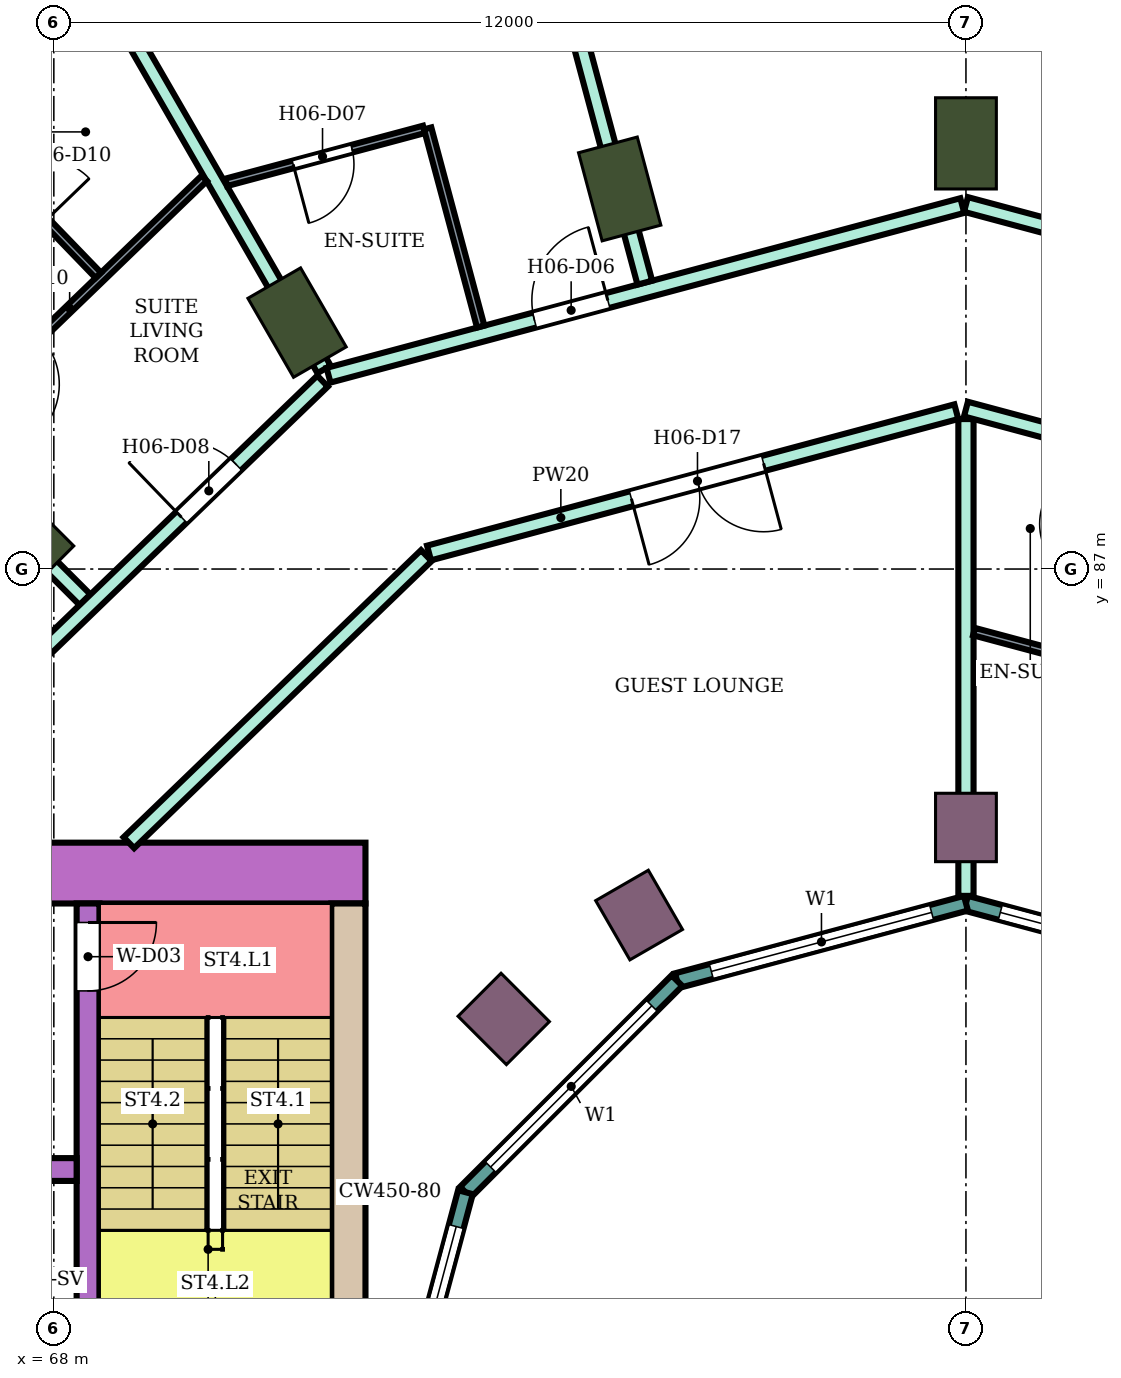
"""IFC4 building model, lengths in metres.
Left out: names, types, materials, properties, quantities, classifications, styles, units other than length and angle.
Written with IfcOpenShell. Run it as: python <this file> out.ifc"""

import sys

from ifc_helpers import new_model, si_unit, direction, frame, frame_2d, origin, origin_2d, place, context, subcontext, project, spatial, rectangle, extrude, element, fill, save


model = new_model("IFC4")
c1 = context("Model", 3, precision=1e-05, world=origin(), true_north=direction((0.0, 1.0)))
c2 = subcontext(c1, "Body", "Model", "MODEL_VIEW")
j1 = project(units=[si_unit("LENGTHUNIT", "METRE"), si_unit("PLANEANGLEUNIT", "RADIAN")], contexts=[c1])
p1 = place(None, origin())
s1 = spatial("IfcSite", under=j1, at=p1, CompositionType="ELEMENT")
p2 = place(p1, origin())
s2 = spatial("IfcBuilding", under=s1, at=p2, CompositionType="ELEMENT")
p3 = place(p2, frame((0.0, 0.0, 93.8)))
s3 = spatial("IfcBuildingStorey", under=s2, at=p3, CompositionType="ELEMENT", Elevation=93.8)
for number, where, z_axis, x_axis in (
    (1, (80.0, 92.6, 0.0), (0.0, 0.0, 1.0), (0.0, 1.0, 0.0)),
    (2, (75.445, 92.0, 0.0), (0.0, 0.0, 1.0), (-0.259, 0.966, 0.0)),
    (3, (71.2, 90.242, 0.0), (0.0, 0.0, 1.0), (-0.5, 0.866, 0.0)),
    (4, (67.555, 87.445, 0.0), (0.0, 0.0, 1.0), (-0.707, 0.707, 0.0)),
):
    element("IfcColumn", number, at=place(p3, frame(where, z_axis=z_axis, x_axis=x_axis)), inside=s3, PredefinedType="COLUMN", context=c2, shape_type="SweptSolid", body=[
        extrude(rectangle(XDim=1.2, YDim=0.8, at=origin_2d()), origin(), (0.0, 0.0, 1.0), 3.8),
    ])
for number, where, z_axis, x_axis in (
    (5, (80.0, 83.6, 0.0), (0.0, 0.0, 1.0), (0.0, 1.0, 0.0)),
    (6, (75.7, 82.448, 0.0), (0.0, 0.0, 1.0), (-0.5, 0.866, 0.0)),
    (7, (73.919, 81.081, 0.0), (0.0, 0.0, 1.0), (-0.707, 0.707, 0.0)),
):
    element("IfcColumn", number, at=place(p3, frame(where, z_axis=z_axis, x_axis=x_axis)), inside=s3, PredefinedType="COLUMN", context=c2, shape_type="SweptSolid", body=[
        extrude(rectangle(XDim=0.9, YDim=0.8, at=origin_2d()), origin(), (0.0, 0.0, 1.0), 3.8),
    ])
p4 = place(p3, frame((72.1, 83.0, 0.0), z_axis=(0.0, 0.0, 1.0), x_axis=(-1.0, 0.0, 0.0)))
e8 = element("IfcWall", 8, at=p4, inside=s3, PredefinedType="SHEAR", context=c2, shape_type="SweptSolid", body=[
    extrude(rectangle(XDim=14.7, YDim=0.8, at=frame_2d((7.35, 0.0))), origin(), (0.0, 0.0, 1.0), 3.48),
])
p5 = place(p4, frame((4.2, 0.0, 0.0)))
e9 = element("IfcOpeningElement", 9, at=p5, cuts=e8, PredefinedType="OPENING", context=c2, shape_type="SweptSolid", body=[
    extrude(rectangle(XDim=2.4, YDim=2.4, at=frame_2d((1.2, 1.2))), frame((0.0, 0.41, 0.0), z_axis=(0.0, -1.0, 0.0), x_axis=(1.0, 0.0, 0.0)), (0.0, 0.0, 1.0), 0.82),
])
p6 = place(p3, frame((71.875, 82.6, 0.0), z_axis=(0.0, 0.0, 1.0), x_axis=(0.0, -1.0, 0.0)))
e10 = element("IfcWall", 10, at=p6, inside=s3, PredefinedType="SHEAR", context=c2, shape_type="SweptSolid", body=[
    extrude(rectangle(XDim=7.6, YDim=0.45, at=frame_2d((3.8, 0.0))), origin(), (0.0, 0.0, 1.0), 3.48),
])
p7 = place(p3, frame((68.45, 82.6, 0.0), z_axis=(0.0, 0.0, 1.0), x_axis=(0.0, -1.0, 0.0)))
e11 = element("IfcWall", 11, at=p7, inside=s3, PredefinedType="SHEAR", context=c2, shape_type="SweptSolid", body=[
    extrude(rectangle(XDim=7.6, YDim=0.3, at=frame_2d((3.8, 0.0))), origin(), (0.0, 0.0, 1.0), 3.48),
])
p8 = place(p7, frame((0.25, 0.0, 0.0)))
e12 = element("IfcOpeningElement", 12, at=p8, cuts=e11, PredefinedType="OPENING", context=c2, shape_type="SweptSolid", body=[
    extrude(rectangle(XDim=0.9, YDim=2.1, at=frame_2d((0.45, 1.05))), frame((0.0, 0.16, 0.0), z_axis=(0.0, -1.0, 0.0), x_axis=(1.0, 0.0, 0.0)), (0.0, 0.0, 1.0), 0.32),
])
p9 = place(p3, frame((68.3, 79.1, 0.0), z_axis=(0.0, 0.0, 1.0), x_axis=(-1.0, 0.0, 0.0)))
e13 = element("IfcWall", 13, at=p9, inside=s3, PredefinedType="SHEAR", context=c2, shape_type="SweptSolid", body=[
    extrude(rectangle(XDim=10.9, YDim=0.3, at=frame_2d((5.45, 0.0))), origin(), (0.0, 0.0, 1.0), 3.48),
])
p10 = place(p9, frame((0.4, 0.0, 0.0)))
e14 = element("IfcOpeningElement", 14, at=p10, cuts=e13, PredefinedType="OPENING", context=c2, shape_type="SweptSolid", body=[
    extrude(rectangle(XDim=1.4, YDim=2.1, at=frame_2d((0.7, 1.05))), frame((0.0, 0.16, 0.0), z_axis=(0.0, -1.0, 0.0), x_axis=(1.0, 0.0, 0.0)), (0.0, 0.0, 1.0), 0.32),
])
p11 = place(p9, frame((5.4, 0.0, 0.0)))
e15 = element("IfcOpeningElement", 15, at=p11, cuts=e13, PredefinedType="OPENING", context=c2, shape_type="SweptSolid", body=[
    extrude(rectangle(XDim=1.4, YDim=2.1, at=frame_2d((0.7, 1.05))), frame((0.0, 0.16, 0.0), z_axis=(0.0, -1.0, 0.0), x_axis=(1.0, 0.0, 0.0)), (0.0, 0.0, 1.0), 0.32),
])
p12 = place(p9, frame((8.1, 0.0, 0.0)))
e16 = element("IfcOpeningElement", 16, at=p12, cuts=e13, PredefinedType="OPENING", context=c2, shape_type="SweptSolid", body=[
    extrude(rectangle(XDim=1.0, YDim=2.1, at=frame_2d((0.5, 1.05))), frame((0.0, 0.16, 0.0), z_axis=(0.0, -1.0, 0.0), x_axis=(1.0, 0.0, 0.0)), (0.0, 0.0, 1.0), 0.32),
])
p13 = place(p3, frame((83.802, 81.585, 0.0), z_axis=(0.0, 0.0, 1.0), x_axis=(-0.965933654434, 0.258789828301, 0.0)))
e17 = element("IfcWall", 17, at=p13, inside=s3, PredefinedType="NOTDEFINED", context=c2, shape_type="SweptSolid", body=[
    extrude(rectangle(XDim=3.936, YDim=0.2, at=frame_2d((1.968, 0.0))), origin(), (0.0, 0.0, 1.0), 3.8),
])
p14 = place(p13, frame((0.468, 0.0, 0.9)))
e18 = element("IfcOpeningElement", 18, at=p14, cuts=e17, PredefinedType="OPENING", context=c2, shape_type="SweptSolid", body=[
    extrude(rectangle(XDim=3.0, YDim=2.3, at=frame_2d((1.5, 1.15))), frame((0.0, 0.11, 0.0), z_axis=(0.0, -1.0, 0.0), x_axis=(1.0, 0.0, 0.0)), (0.0, 0.0, 1.0), 0.22),
])
p15 = place(p3, frame((80.0, 82.604, 0.0), z_axis=(0.0, 0.0, 1.0), x_axis=(-0.965933654434, -0.258789828301, 0.0)))
e19 = element("IfcWall", 19, at=p15, inside=s3, PredefinedType="NOTDEFINED", context=c2, shape_type="SweptSolid", body=[
    extrude(rectangle(XDim=3.936, YDim=0.2, at=frame_2d((1.968, 0.0))), origin(), (0.0, 0.0, 1.0), 3.8),
])
p16 = place(p15, frame((0.468, 0.0, 0.9)))
e20 = element("IfcOpeningElement", 20, at=p16, cuts=e19, PredefinedType="OPENING", context=c2, shape_type="SweptSolid", body=[
    extrude(rectangle(XDim=3.0, YDim=2.3, at=frame_2d((1.5, 1.15))), frame((0.0, 0.11, 0.0), z_axis=(0.0, -1.0, 0.0), x_axis=(1.0, 0.0, 0.0)), (0.0, 0.0, 1.0), 0.22),
])
p17 = place(p3, frame((76.198, 81.585, 0.0), z_axis=(0.0, 0.0, 1.0), x_axis=(-0.707106781187, -0.707106781187, 0.0)))
e21 = element("IfcWall", 21, at=p17, inside=s3, PredefinedType="NOTDEFINED", context=c2, shape_type="SweptSolid", body=[
    extrude(rectangle(XDim=3.936, YDim=0.2, at=frame_2d((1.968, 0.0))), origin(), (0.0, 0.0, 1.0), 3.8),
])
p18 = place(p17, frame((0.468, 0.0, 0.9)))
e22 = element("IfcOpeningElement", 22, at=p18, cuts=e21, PredefinedType="OPENING", context=c2, shape_type="SweptSolid", body=[
    extrude(rectangle(XDim=3.0, YDim=2.3, at=frame_2d((1.5, 1.15))), frame((0.0, 0.11, 0.0), z_axis=(0.0, -1.0, 0.0), x_axis=(1.0, 0.0, 0.0)), (0.0, 0.0, 1.0), 0.22),
])
p19 = place(p3, frame((73.415, 78.802, 0.0), z_axis=(0.0, 0.0, 1.0), x_axis=(-0.258789828301, -0.965933654434, 0.0)))
e23 = element("IfcWall", 23, at=p19, inside=s3, PredefinedType="NOTDEFINED", context=c2, shape_type="SweptSolid", body=[
    extrude(rectangle(XDim=3.936, YDim=0.2, at=frame_2d((1.968, 0.0))), origin(), (0.0, 0.0, 1.0), 3.8),
])
p20 = place(p19, frame((0.468, 0.0, 0.9)))
e24 = element("IfcOpeningElement", 24, at=p20, cuts=e23, PredefinedType="OPENING", context=c2, shape_type="SweptSolid", body=[
    extrude(rectangle(XDim=3.0, YDim=2.3, at=frame_2d((1.5, 1.15))), frame((0.0, 0.11, 0.0), z_axis=(0.0, -1.0, 0.0), x_axis=(1.0, 0.0, 0.0)), (0.0, 0.0, 1.0), 0.22),
])
p21 = place(p3, frame((63.6, 91.409, 0.0), z_axis=(0.0, 0.0, 1.0), x_axis=(0.706945318761, -0.707268206752, 0.0)))
e25 = element("IfcWall", 25, at=p21, inside=s3, PredefinedType="PARTITIONING", context=c2, shape_type="SweptSolid", body=[
    extrude(rectangle(XDim=6.805, YDim=0.2, at=frame_2d((3.402, 0.0))), origin(), (0.0, 0.0, 1.0), 3.35),
])
p22 = place(p3, frame((66.796, 84.9, 0.0), z_axis=(0.0, 0.0, 1.0), x_axis=(0.719690784855, 0.694294731505, 0.0)))
e26 = element("IfcWall", 26, at=p22, inside=s3, PredefinedType="PARTITIONING", context=c2, shape_type="SweptSolid", body=[
    extrude(rectangle(XDim=6.585, YDim=0.2, at=frame_2d((3.292, 0.0))), origin(), (0.0, 0.0, 1.0), 3.35),
])
p23 = place(p22, frame((4.006, 0.0, 0.0)))
e27 = element("IfcOpeningElement", 27, at=p23, cuts=e26, PredefinedType="OPENING", context=c2, shape_type="SweptSolid", body=[
    extrude(rectangle(XDim=1.0, YDim=2.1, at=frame_2d((0.5, 1.05))), frame((0.0, 0.11, 0.0), z_axis=(0.0, -1.0, 0.0), x_axis=(1.0, 0.0, 0.0)), (0.0, 0.0, 1.0), 0.22),
])
p24 = place(p3, frame((67.102, 97.342, 0.0), z_axis=(0.0, 0.0, 1.0), x_axis=(0.499900389553, -0.866082906265, 0.0)))
e28 = element("IfcWall", 28, at=p24, inside=s3, PredefinedType="PARTITIONING", context=c2, shape_type="SweptSolid", body=[
    extrude(rectangle(XDim=8.908, YDim=0.2, at=frame_2d((4.454, 0.0))), origin(), (0.0, 0.0, 1.0), 3.35),
])
p25 = place(p3, frame((68.987, 83.4, 0.0), z_axis=(0.0, 0.0, 1.0), x_axis=(0.719586298962, 0.694403022997, 0.0)))
e29 = element("IfcWall", 29, at=p25, inside=s3, PredefinedType="PARTITIONING", context=c2, shape_type="SweptSolid", body=[
    extrude(rectangle(XDim=5.439, YDim=0.2, at=frame_2d((2.719, 0.0))), origin(), (0.0, 0.0, 1.0), 3.35),
])
p26 = place(p3, frame((71.614, 89.55, 0.0), z_axis=(0.0, 0.0, 1.0), x_axis=(0.965982378603, 0.258607896685, 0.0)))
e30 = element("IfcWall", 30, at=p26, inside=s3, PredefinedType="PARTITIONING", context=c2, shape_type="SweptSolid", body=[
    extrude(rectangle(XDim=8.632, YDim=0.2, at=frame_2d((4.316, 0.0))), origin(), (0.0, 0.0, 1.0), 3.35),
])
p27 = place(p26, frame((2.804, 0.0, 0.0)))
e31 = element("IfcOpeningElement", 31, at=p27, cuts=e30, PredefinedType="OPENING", context=c2, shape_type="SweptSolid", body=[
    extrude(rectangle(XDim=1.0, YDim=2.1, at=frame_2d((0.5, 1.05))), frame((0.0, 0.11, 0.0), z_axis=(0.0, -1.0, 0.0), x_axis=(1.0, 0.0, 0.0)), (0.0, 0.0, 1.0), 0.22),
])
p28 = place(p3, frame((72.936, 87.211, 0.0), z_axis=(0.0, 0.0, 1.0), x_axis=(0.965917703859, 0.258849356521, 0.0)))
e32 = element("IfcWall", 32, at=p28, inside=s3, PredefinedType="PARTITIONING", context=c2, shape_type="SweptSolid", body=[
    extrude(rectangle(XDim=7.182, YDim=0.2, at=frame_2d((3.591, 0.0))), origin(), (0.0, 0.0, 1.0), 3.35),
])
p29 = place(p28, frame((2.757, 0.0, 0.0)))
e33 = element("IfcOpeningElement", 33, at=p29, cuts=e32, PredefinedType="OPENING", context=c2, shape_type="SweptSolid", body=[
    extrude(rectangle(XDim=1.8, YDim=2.1, at=frame_2d((0.9, 1.05))), frame((0.0, 0.11, 0.0), z_axis=(0.0, -1.0, 0.0), x_axis=(1.0, 0.0, 0.0)), (0.0, 0.0, 1.0), 0.22),
])
p30 = place(p3, frame((73.323, 99.918, 0.0), z_axis=(0.0, 0.0, 1.0), x_axis=(0.258812513968, -0.965927576278, 0.0)))
e34 = element("IfcWall", 34, at=p30, inside=s3, PredefinedType="PARTITIONING", context=c2, shape_type="SweptSolid", body=[
    extrude(rectangle(XDim=9.474, YDim=0.2, at=frame_2d((4.737, 0.0))), origin(), (0.0, 0.0, 1.0), 3.35),
])
p31 = place(p3, frame((80.0, 82.7, 0.0), z_axis=(0.0, 0.0, 1.0), x_axis=(0.0, 1.0, 0.0)))
e35 = element("IfcWall", 35, at=p31, inside=s3, PredefinedType="PARTITIONING", context=c2, shape_type="SweptSolid", body=[
    extrude(rectangle(XDim=6.273, YDim=0.2, at=frame_2d((3.136, 0.0))), origin(), (0.0, 0.0, 1.0), 3.35),
])
p32 = place(p3, frame((80.0, 89.104, 0.0), z_axis=(0.0, 0.0, 1.0), x_axis=(0.965856548257, -0.259077455964, 0.0)))
e36 = element("IfcWall", 36, at=p32, inside=s3, PredefinedType="PARTITIONING", context=c2, shape_type="SweptSolid", body=[
    extrude(rectangle(XDim=7.173, YDim=0.2, at=frame_2d((3.586, 0.0))), origin(), (0.0, 0.0, 1.0), 3.35),
])
p33 = place(p32, frame((5.763, 0.0, 0.0)))
e37 = element("IfcOpeningElement", 37, at=p33, cuts=e36, PredefinedType="OPENING", context=c2, shape_type="SweptSolid", body=[
    extrude(rectangle(XDim=1.0, YDim=2.1, at=frame_2d((0.5, 1.05))), frame((0.0, 0.11, 0.0), z_axis=(0.0, -1.0, 0.0), x_axis=(1.0, 0.0, 0.0)), (0.0, 0.0, 1.0), 0.22),
])
p34 = place(p3, frame((80.0, 91.796, 0.0), z_axis=(0.0, 0.0, 1.0), x_axis=(0.965917643923, -0.258849580177, 0.0)))
e38 = element("IfcWall", 38, at=p34, inside=s3, PredefinedType="PARTITIONING", context=c2, shape_type="SweptSolid", body=[
    extrude(rectangle(XDim=8.602, YDim=0.2, at=frame_2d((4.301, 0.0))), origin(), (0.0, 0.0, 1.0), 3.35),
])
p35 = place(p34, frame((2.091, 0.0, 0.0)))
e39 = element("IfcOpeningElement", 39, at=p35, cuts=e38, PredefinedType="OPENING", context=c2, shape_type="SweptSolid", body=[
    extrude(rectangle(XDim=1.8, YDim=2.1, at=frame_2d((0.9, 1.05))), frame((0.0, 0.11, 0.0), z_axis=(0.0, -1.0, 0.0), x_axis=(1.0, 0.0, 0.0)), (0.0, 0.0, 1.0), 0.22),
])
p36 = place(p3, frame((66.436, 88.72, 0.0), z_axis=(0.0, 0.0, 1.0), x_axis=(0.719585934284, 0.694403400899, 0.0)))
e40 = element("IfcWall", 40, at=p36, inside=s3, PredefinedType="PARTITIONING", context=c2, shape_type="SweptSolid", body=[
    extrude(rectangle(XDim=4.925, YDim=0.1, at=frame_2d((2.462, 0.0))), origin(), (0.0, 0.0, 1.0), 3.35),
])
p37 = place(p36, frame((1.022, 0.0, 0.0)))
e41 = element("IfcOpeningElement", 41, at=p37, cuts=e40, PredefinedType="OPENING", context=c2, shape_type="SweptSolid", body=[
    extrude(rectangle(XDim=0.9, YDim=2.1, at=frame_2d((0.45, 1.05))), frame((0.0, 0.06, 0.0), z_axis=(0.0, -1.0, 0.0), x_axis=(1.0, 0.0, 0.0)), (0.0, 0.0, 1.0), 0.12),
])
p38 = place(p3, frame((66.642, 92.95, 0.0), z_axis=(0.0, 0.0, 1.0), x_axis=(0.719667412702, 0.694318957753, 0.0)))
e42 = element("IfcWall", 42, at=p38, inside=s3, PredefinedType="PARTITIONING", context=c2, shape_type="SweptSolid", body=[
    extrude(rectangle(XDim=2.562, YDim=0.1, at=frame_2d((1.281, 0.0))), origin(), (0.0, 0.0, 1.0), 3.35),
])
p39 = place(p3, frame((66.606, 92.915, 0.0), z_axis=(0.0, 0.0, 1.0), x_axis=(0.694403413121, -0.71958592249, 0.0)))
e43 = element("IfcWall", 43, at=p39, inside=s3, PredefinedType="PARTITIONING", context=c2, shape_type="SweptSolid", body=[
    extrude(rectangle(XDim=2.85, YDim=0.1, at=frame_2d((1.425, 0.0))), origin(), (0.0, 0.0, 1.0), 3.35),
])
p40 = place(p39, frame((1.05, 0.0, 0.0)))
e44 = element("IfcOpeningElement", 44, at=p40, cuts=e43, PredefinedType="OPENING", context=c2, shape_type="SweptSolid", body=[
    extrude(rectangle(XDim=0.8, YDim=2.1, at=frame_2d((0.4, 1.05))), frame((0.0, 0.06, 0.0), z_axis=(0.0, -1.0, 0.0), x_axis=(1.0, 0.0, 0.0)), (0.0, 0.0, 1.0), 0.12),
])
p41 = place(p3, frame((70.268, 92.087, 0.0), z_axis=(0.0, 0.0, 1.0), x_axis=(0.965937937835, 0.258773839966, 0.0)))
e45 = element("IfcWall", 45, at=p41, inside=s3, PredefinedType="PARTITIONING", context=c2, shape_type="SweptSolid", body=[
    extrude(rectangle(XDim=2.694, YDim=0.1, at=frame_2d((1.347, 0.0))), origin(), (0.0, 0.0, 1.0), 3.35),
])
p42 = place(p41, frame((0.912, 0.0, 0.0)))
e46 = element("IfcOpeningElement", 46, at=p42, cuts=e45, PredefinedType="OPENING", context=c2, shape_type="SweptSolid", body=[
    extrude(rectangle(XDim=0.8, YDim=2.1, at=frame_2d((0.4, 1.05))), frame((0.0, 0.06, 0.0), z_axis=(0.0, -1.0, 0.0), x_axis=(1.0, 0.0, 0.0)), (0.0, 0.0, 1.0), 0.12),
])
p43 = place(p3, frame((72.918, 92.797, 0.0), z_axis=(0.0, 0.0, 1.0), x_axis=(0.25867580527, -0.965964195904, 0.0)))
e47 = element("IfcWall", 47, at=p43, inside=s3, PredefinedType="PARTITIONING", context=c2, shape_type="SweptSolid", body=[
    extrude(rectangle(XDim=2.699, YDim=0.1, at=frame_2d((1.35, 0.0))), origin(), (0.0, 0.0, 1.0), 3.35),
])
p44 = place(p3, frame((80.106, 86.177, 0.0), z_axis=(0.0, 0.0, 1.0), x_axis=(0.966002973184, -0.258530957139, 0.0)))
e48 = element("IfcWall", 48, at=p44, inside=s3, PredefinedType="PARTITIONING", context=c2, shape_type="SweptSolid", body=[
    extrude(rectangle(XDim=1.19, YDim=0.1, at=frame_2d((0.595, 0.0))), origin(), (0.0, 0.0, 1.0), 3.35),
])
p45 = place(p14, origin())
e49 = element("IfcWindow", 49, at=p45, inside=s3, PartitioningType="SINGLE_PANEL", PredefinedType="WINDOW", context=c2, shape_type="SweptSolid", body=[
    extrude(rectangle(XDim=3.0, YDim=2.3, at=frame_2d((1.5, 1.15))), frame((0.0, 0.03, 0.0), z_axis=(0.0, -1.0, 0.0), x_axis=(1.0, 0.0, 0.0)), (0.0, 0.0, 1.0), 0.06),
])
fill(e18, e49)
p46 = place(p16, origin())
e50 = element("IfcWindow", 50, at=p46, inside=s3, PartitioningType="SINGLE_PANEL", PredefinedType="WINDOW", context=c2, shape_type="SweptSolid", body=[
    extrude(rectangle(XDim=3.0, YDim=2.3, at=frame_2d((1.5, 1.15))), frame((0.0, 0.03, 0.0), z_axis=(0.0, -1.0, 0.0), x_axis=(1.0, 0.0, 0.0)), (0.0, 0.0, 1.0), 0.06),
])
fill(e20, e50)
p47 = place(p18, origin())
e51 = element("IfcWindow", 51, at=p47, inside=s3, PartitioningType="SINGLE_PANEL", PredefinedType="WINDOW", context=c2, shape_type="SweptSolid", body=[
    extrude(rectangle(XDim=3.0, YDim=2.3, at=frame_2d((1.5, 1.15))), frame((0.0, 0.03, 0.0), z_axis=(0.0, -1.0, 0.0), x_axis=(1.0, 0.0, 0.0)), (0.0, 0.0, 1.0), 0.06),
])
fill(e22, e51)
p48 = place(p20, origin())
e52 = element("IfcWindow", 52, at=p48, inside=s3, PartitioningType="SINGLE_PANEL", PredefinedType="WINDOW", context=c2, shape_type="SweptSolid", body=[
    extrude(rectangle(XDim=3.0, YDim=2.3, at=frame_2d((1.5, 1.15))), frame((0.0, 0.03, 0.0), z_axis=(0.0, -1.0, 0.0), x_axis=(1.0, 0.0, 0.0)), (0.0, 0.0, 1.0), 0.06),
])
fill(e24, e52)
p49 = place(p27, origin())
e53 = element("IfcDoor", 53, at=p49, inside=s3, OperationType="SINGLE_SWING_RIGHT", PredefinedType="DOOR", context=c2, shape_type="SweptSolid", body=[
    extrude(rectangle(XDim=1.0, YDim=2.1, at=frame_2d((0.5, 1.05))), frame((0.0, 0.025, 0.0), z_axis=(0.0, -1.0, 0.0), x_axis=(1.0, 0.0, 0.0)), (0.0, 0.0, 1.0), 0.05),
])
fill(e31, e53)
p50 = place(p42, frame((0.8, 0.0, 0.0), z_axis=(0.0, 0.0, 1.0), x_axis=(-1.0, 0.0, 0.0)))
e54 = element("IfcDoor", 54, at=p50, inside=s3, OperationType="SINGLE_SWING_RIGHT", PredefinedType="DOOR", context=c2, shape_type="SweptSolid", body=[
    extrude(rectangle(XDim=0.8, YDim=2.1, at=frame_2d((0.4, 1.05))), frame((0.0, 0.025, 0.0), z_axis=(0.0, -1.0, 0.0), x_axis=(1.0, 0.0, 0.0)), (0.0, 0.0, 1.0), 0.05),
])
fill(e46, e54)
p51 = place(p23, origin())
e55 = element("IfcDoor", 55, at=p51, inside=s3, OperationType="SINGLE_SWING_LEFT", PredefinedType="DOOR", context=c2, shape_type="SweptSolid", body=[
    extrude(rectangle(XDim=1.0, YDim=2.1, at=frame_2d((0.5, 1.05))), frame((0.0, 0.025, 0.0), z_axis=(0.0, -1.0, 0.0), x_axis=(1.0, 0.0, 0.0)), (0.0, 0.0, 1.0), 0.05),
])
fill(e27, e55)
p52 = place(p29, frame((1.8, 0.0, 0.0), z_axis=(0.0, 0.0, 1.0), x_axis=(-1.0, 0.0, 0.0)))
e56 = element("IfcDoor", 56, at=p52, inside=s3, OperationType="DOUBLE_DOOR_SINGLE_SWING", PredefinedType="DOOR", context=c2, shape_type="SweptSolid", body=[
    extrude(rectangle(XDim=1.8, YDim=2.1, at=frame_2d((0.9, 1.05))), frame((0.0, 0.025, 0.0), z_axis=(0.0, -1.0, 0.0), x_axis=(1.0, 0.0, 0.0)), (0.0, 0.0, 1.0), 0.05),
])
fill(e33, e56)
p53 = place(p8, origin())
e57 = element("IfcDoor", 57, at=p53, inside=s3, OperationType="SINGLE_SWING_LEFT", PredefinedType="DOOR", context=c2, shape_type="SweptSolid", body=[
    extrude(rectangle(XDim=0.9, YDim=2.1, at=frame_2d((0.45, 1.05))), frame((0.0, 0.025, 0.0), z_axis=(0.0, -1.0, 0.0), x_axis=(1.0, 0.0, 0.0)), (0.0, 0.0, 1.0), 0.05),
])
fill(e12, e57)
save(model, sys.argv[1])
